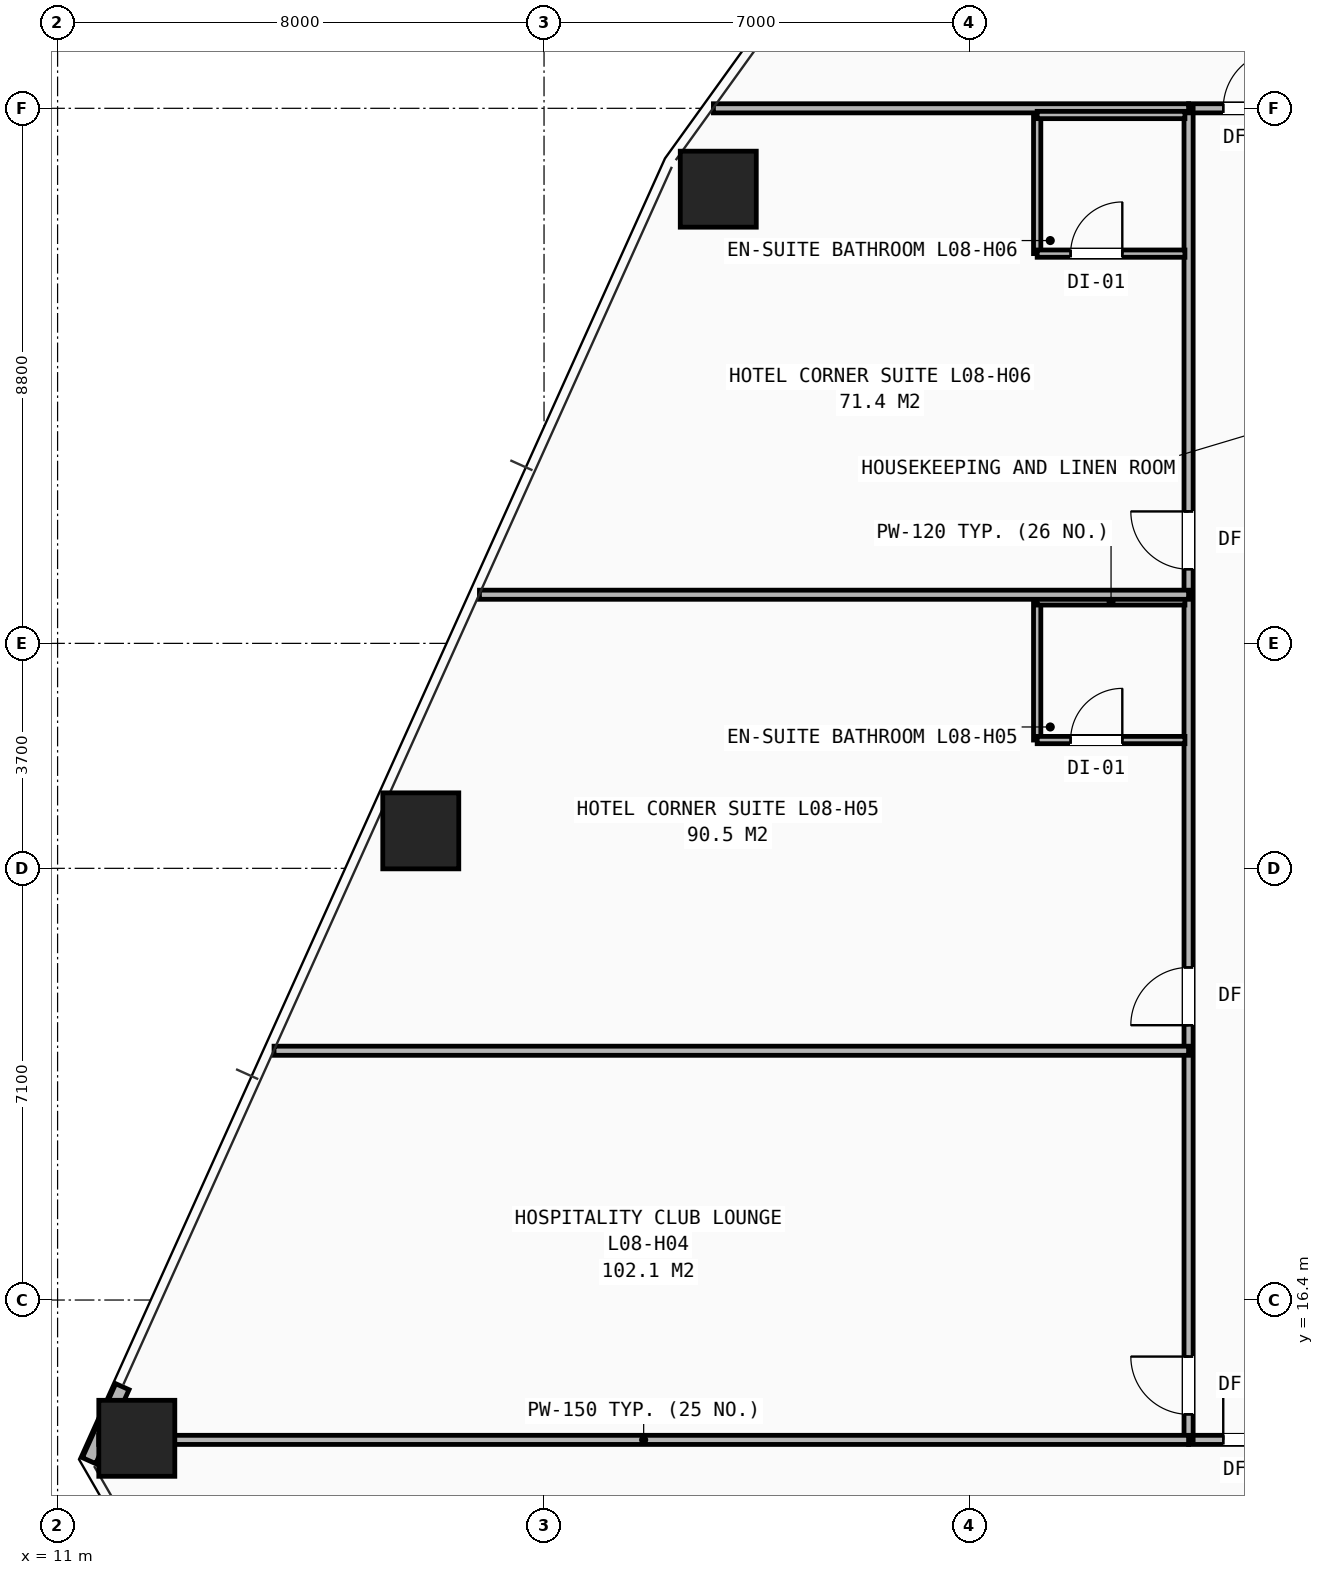
"""IFC4 building model, lengths in metres.
Left out: names, types, materials, properties, quantities, classifications, styles, units other than length and angle.
Written with IfcOpenShell. Run it as: python <this file> out.ifc"""

import sys

from ifc_helpers import new_model, si_unit, direction, frame, frame_2d, origin, origin_2d, place, context, subcontext, project, spatial, rectangle, hollow_rectangle, extrude, element, fill, save


model = new_model("IFC4")
c1 = context("Model", 3, precision=1e-05, world=origin(), true_north=direction((0.0, 1.0)))
c2 = subcontext(c1, "Body", "Model", "MODEL_VIEW")
j1 = project(units=[si_unit("LENGTHUNIT", "METRE"), si_unit("PLANEANGLEUNIT", "RADIAN")], contexts=[c1])
p1 = place(None, origin())
s1 = spatial("IfcSite", under=j1, at=p1, CompositionType="ELEMENT")
p2 = place(p1, origin())
s2 = spatial("IfcBuilding", under=s1, at=p2, CompositionType="ELEMENT")
p3 = place(p2, frame((0.0, 0.0, 33.6)))
s3 = spatial("IfcBuildingStorey", under=s2, at=p3, CompositionType="ELEMENT", Elevation=33.6)
for number, where, z_axis, x_axis in (
    (1, (21.865, 34.67, 0.0), (0.0, 0.0, 1.0), (1.0, 0.0, 0.0)),
    (2, (16.973, 24.116, 0.0), (0.0, 0.0, 1.0), (1.0, 0.0, 0.0)),
    (3, (12.303, 14.126, 0.0), (0.0, 0.0, 1.0), (1.0, 0.0, 0.0)),
):
    element("IfcColumn", number, at=place(p3, frame(where, z_axis=z_axis, x_axis=x_axis)), inside=s3, PredefinedType="COLUMN", context=c2, shape_type="SweptSolid", body=[
        extrude(hollow_rectangle(XDim=1.25, YDim=1.25, WallThickness=0.08, at=origin_2d()), origin(), (0.0, 0.0, 1.0), 3.2),
    ])
p4 = place(p3, frame((12.065, 14.975, 0.0), z_axis=(0.0, 0.0, 1.0), x_axis=(-0.410767856127, -0.91173996752, 0.0)))
e4 = element("IfcWall", 4, at=p4, inside=s3, PredefinedType="SHEAR", context=c2, shape_type="SweptSolid", body=[
    extrude(rectangle(XDim=1.334, YDim=0.24, at=frame_2d((0.667, 0.0))), origin(), (0.0, 0.0, 1.0), 2.263),
])
p5 = place(p3, frame((29.6, 14.1, 0.0), z_axis=(0.0, 0.0, 1.0), x_axis=(1.0, 0.0, 0.0)))
e5 = element("IfcWall", 5, at=p5, inside=s3, PredefinedType="PARTITIONING", context=c2, shape_type="SweptSolid", body=[
    extrude(rectangle(XDim=20.8, YDim=0.15, at=frame_2d((10.4, 0.0))), origin(), (0.0, 0.0, 1.0), 2.191),
])
p6 = place(p5, frame((0.57, 0.0, 0.0)))
e6 = element("IfcOpeningElement", 6, at=p6, cuts=e5, PredefinedType="OPENING", context=c2, shape_type="SweptSolid", body=[
    extrude(rectangle(XDim=0.95, YDim=2.1, at=frame_2d((0.475, 1.05))), frame((0.0, 0.085, 0.0), z_axis=(0.0, -1.0, 0.0), x_axis=(1.0, 0.0, 0.0)), (0.0, 0.0, 1.0), 0.17),
])
p7 = place(p5, frame((5.32, 0.0, 0.0)))
e7 = element("IfcOpeningElement", 7, at=p7, cuts=e5, PredefinedType="OPENING", context=c2, shape_type="SweptSolid", body=[
    extrude(rectangle(XDim=0.95, YDim=2.1, at=frame_2d((0.475, 1.05))), frame((0.0, 0.085, 0.0), z_axis=(0.0, -1.0, 0.0), x_axis=(1.0, 0.0, 0.0)), (0.0, 0.0, 1.0), 0.17),
])
p8 = place(p5, frame((13.32, 0.0, 0.0)))
e8 = element("IfcOpeningElement", 8, at=p8, cuts=e5, PredefinedType="OPENING", context=c2, shape_type="SweptSolid", body=[
    extrude(rectangle(XDim=0.95, YDim=2.1, at=frame_2d((0.475, 1.05))), frame((0.0, 0.085, 0.0), z_axis=(0.0, -1.0, 0.0), x_axis=(1.0, 0.0, 0.0)), (0.0, 0.0, 1.0), 0.17),
])
p9 = place(p3, frame((29.6, 36.0, 0.0), z_axis=(0.0, 0.0, 1.0), x_axis=(1.0, 0.0, 0.0)))
e9 = element("IfcWall", 9, at=p9, inside=s3, PredefinedType="PARTITIONING", context=c2, shape_type="SweptSolid", body=[
    extrude(rectangle(XDim=10.375, YDim=0.15, at=frame_2d((5.188, 0.0))), origin(), (0.0, 0.0, 1.0), 2.98),
])
p10 = place(p9, frame((0.57, 0.0, 0.0)))
e10 = element("IfcOpeningElement", 10, at=p10, cuts=e9, PredefinedType="OPENING", context=c2, shape_type="SweptSolid", body=[
    extrude(rectangle(XDim=0.95, YDim=2.1, at=frame_2d((0.475, 1.05))), frame((0.0, 0.085, 0.0), z_axis=(0.0, -1.0, 0.0), x_axis=(1.0, 0.0, 0.0)), (0.0, 0.0, 1.0), 0.17),
])
p11 = place(p9, frame((5.32, 0.0, 0.0)))
e11 = element("IfcOpeningElement", 11, at=p11, cuts=e9, PredefinedType="OPENING", context=c2, shape_type="SweptSolid", body=[
    extrude(rectangle(XDim=0.95, YDim=2.1, at=frame_2d((0.475, 1.05))), frame((0.0, 0.085, 0.0), z_axis=(0.0, -1.0, 0.0), x_axis=(1.0, 0.0, 0.0)), (0.0, 0.0, 1.0), 0.17),
])
p12 = place(p3, frame((29.6, 14.1, 0.0), z_axis=(0.0, 0.0, 1.0), x_axis=(0.0, 1.0, 0.0)))
e12 = element("IfcWall", 12, at=p12, inside=s3, PredefinedType="PARTITIONING", context=c2, shape_type="SweptSolid", body=[
    extrude(rectangle(XDim=21.9, YDim=0.15, at=frame_2d((10.95, 0.0))), origin(), (0.0, 0.0, 1.0), 2.191),
])
p13 = place(p12, frame((0.42, 0.0, 0.0)))
e13 = element("IfcOpeningElement", 13, at=p13, cuts=e12, PredefinedType="OPENING", context=c2, shape_type="SweptSolid", body=[
    extrude(rectangle(XDim=0.95, YDim=2.1, at=frame_2d((0.475, 1.05))), frame((0.0, 0.085, 0.0), z_axis=(0.0, -1.0, 0.0), x_axis=(1.0, 0.0, 0.0)), (0.0, 0.0, 1.0), 0.17),
])
p14 = place(p12, frame((6.82, 0.0, 0.0)))
e14 = element("IfcOpeningElement", 14, at=p14, cuts=e12, PredefinedType="OPENING", context=c2, shape_type="SweptSolid", body=[
    extrude(rectangle(XDim=0.95, YDim=2.1, at=frame_2d((0.475, 1.05))), frame((0.0, 0.085, 0.0), z_axis=(0.0, -1.0, 0.0), x_axis=(1.0, 0.0, 0.0)), (0.0, 0.0, 1.0), 0.17),
])
p15 = place(p12, frame((14.32, 0.0, 0.0)))
e15 = element("IfcOpeningElement", 15, at=p15, cuts=e12, PredefinedType="OPENING", context=c2, shape_type="SweptSolid", body=[
    extrude(rectangle(XDim=0.95, YDim=2.1, at=frame_2d((0.475, 1.05))), frame((0.0, 0.085, 0.0), z_axis=(0.0, -1.0, 0.0), x_axis=(1.0, 0.0, 0.0)), (0.0, 0.0, 1.0), 0.17),
])
p16 = place(p3, frame((11.677, 14.1, 0.0), z_axis=(0.0, 0.0, 1.0), x_axis=(1.0, 0.0, 0.0)))
e16 = element("IfcWall", 16, at=p16, inside=s3, PredefinedType="PARTITIONING", context=c2, shape_type="SweptSolid", body=[
    extrude(rectangle(XDim=17.923, YDim=0.15, at=frame_2d((8.961, 0.0))), origin(), (0.0, 0.0, 1.0), 2.191),
])
p17 = place(p3, frame((21.786, 36.0, 0.0), z_axis=(0.0, 0.0, 1.0), x_axis=(1.0, 0.0, 0.0)))
e17 = element("IfcWall", 17, at=p17, inside=s3, PredefinedType="PARTITIONING", context=c2, shape_type="SweptSolid", body=[
    extrude(rectangle(XDim=7.814, YDim=0.15, at=frame_2d((3.907, 0.0))), origin(), (0.0, 0.0, 1.0), 2.268),
])
p18 = place(p3, frame((14.56, 20.5, 0.0), z_axis=(0.0, 0.0, 1.0), x_axis=(1.0, 0.0, 0.0)))
e18 = element("IfcWall", 18, at=p18, inside=s3, PredefinedType="PARTITIONING", context=c2, shape_type="SweptSolid", body=[
    extrude(rectangle(XDim=15.041, YDim=0.15, at=frame_2d((7.52, 0.0))), origin(), (0.0, 0.0, 1.0), 2.268),
])
p19 = place(p3, frame((27.11, 25.61, 0.0), z_axis=(0.0, 0.0, 1.0), x_axis=(0.0, 1.0, 0.0)))
e19 = element("IfcWall", 19, at=p19, inside=s3, PredefinedType="PARTITIONING", context=c2, shape_type="SweptSolid", body=[
    extrude(rectangle(XDim=2.28, YDim=0.12, at=frame_2d((1.14, 0.0))), origin(), (0.0, 0.0, 1.0), 2.98),
])
p20 = place(p3, frame((27.11, 25.61, 0.0), z_axis=(0.0, 0.0, 1.0), x_axis=(1.0, 0.0, 0.0)))
e20 = element("IfcWall", 20, at=p20, inside=s3, PredefinedType="PARTITIONING", context=c2, shape_type="SweptSolid", body=[
    extrude(rectangle(XDim=2.43, YDim=0.12, at=frame_2d((1.215, 0.0))), origin(), (0.0, 0.0, 1.0), 2.98),
])
p21 = place(p20, frame((0.55, 0.0, 0.0)))
e21 = element("IfcOpeningElement", 21, at=p21, cuts=e20, PredefinedType="OPENING", context=c2, shape_type="SweptSolid", body=[
    extrude(rectangle(XDim=0.85, YDim=2.05, at=frame_2d((0.425, 1.025))), frame((0.0, 0.07, 0.0), z_axis=(0.0, -1.0, 0.0), x_axis=(1.0, 0.0, 0.0)), (0.0, 0.0, 1.0), 0.14),
])
p22 = place(p3, frame((27.11, 27.89, 0.0), z_axis=(0.0, 0.0, 1.0), x_axis=(1.0, 0.0, 0.0)))
e22 = element("IfcWall", 22, at=p22, inside=s3, PredefinedType="PARTITIONING", context=c2, shape_type="SweptSolid", body=[
    extrude(rectangle(XDim=2.43, YDim=0.12, at=frame_2d((1.215, 0.0))), origin(), (0.0, 0.0, 1.0), 2.98),
])
p23 = place(p3, frame((17.938, 28.0, 0.0), z_axis=(0.0, 0.0, 1.0), x_axis=(1.0, 0.0, 0.0)))
e23 = element("IfcWall", 23, at=p23, inside=s3, PredefinedType="PARTITIONING", context=c2, shape_type="SweptSolid", body=[
    extrude(rectangle(XDim=11.662, YDim=0.15, at=frame_2d((5.831, 0.0))), origin(), (0.0, 0.0, 1.0), 2.268),
])
p24 = place(p3, frame((27.11, 33.61, 0.0), z_axis=(0.0, 0.0, 1.0), x_axis=(0.0, 1.0, 0.0)))
e24 = element("IfcWall", 24, at=p24, inside=s3, PredefinedType="PARTITIONING", context=c2, shape_type="SweptSolid", body=[
    extrude(rectangle(XDim=2.28, YDim=0.12, at=frame_2d((1.14, 0.0))), origin(), (0.0, 0.0, 1.0), 2.513),
])
p25 = place(p3, frame((27.11, 33.61, 0.0), z_axis=(0.0, 0.0, 1.0), x_axis=(1.0, 0.0, 0.0)))
e25 = element("IfcWall", 25, at=p25, inside=s3, PredefinedType="PARTITIONING", context=c2, shape_type="SweptSolid", body=[
    extrude(rectangle(XDim=2.43, YDim=0.12, at=frame_2d((1.215, 0.0))), origin(), (0.0, 0.0, 1.0), 2.98),
])
p26 = place(p25, frame((0.55, 0.0, 0.0)))
e26 = element("IfcOpeningElement", 26, at=p26, cuts=e25, PredefinedType="OPENING", context=c2, shape_type="SweptSolid", body=[
    extrude(rectangle(XDim=0.85, YDim=2.05, at=frame_2d((0.425, 1.025))), frame((0.0, 0.07, 0.0), z_axis=(0.0, -1.0, 0.0), x_axis=(1.0, 0.0, 0.0)), (0.0, 0.0, 1.0), 0.14),
])
p27 = place(p3, frame((27.11, 35.89, 0.0), z_axis=(0.0, 0.0, 1.0), x_axis=(1.0, 0.0, 0.0)))
e27 = element("IfcWall", 27, at=p27, inside=s3, PredefinedType="PARTITIONING", context=c2, shape_type="SweptSolid", body=[
    extrude(rectangle(XDim=2.43, YDim=0.12, at=frame_2d((1.215, 0.0))), origin(), (0.0, 0.0, 1.0), 2.513),
])
p28 = place(p6, origin())
e28 = element("IfcDoor", 28, at=p28, inside=s3, OperationType="SINGLE_SWING_LEFT", PredefinedType="DOOR", context=c2, shape_type="SweptSolid", body=[
    extrude(rectangle(XDim=0.95, YDim=2.1, at=frame_2d((0.475, 1.05))), frame((0.0, 0.025, 0.0), z_axis=(0.0, -1.0, 0.0), x_axis=(1.0, 0.0, 0.0)), (0.0, 0.0, 1.0), 0.05),
])
fill(e6, e28)
p29 = place(p13, origin())
e29 = element("IfcDoor", 29, at=p29, inside=s3, OperationType="SINGLE_SWING_RIGHT", PredefinedType="DOOR", context=c2, shape_type="SweptSolid", body=[
    extrude(rectangle(XDim=0.95, YDim=2.1, at=frame_2d((0.475, 1.05))), frame((0.0, 0.025, 0.0), z_axis=(0.0, -1.0, 0.0), x_axis=(1.0, 0.0, 0.0)), (0.0, 0.0, 1.0), 0.05),
])
fill(e13, e29)
p30 = place(p14, origin())
e30 = element("IfcDoor", 30, at=p30, inside=s3, OperationType="SINGLE_SWING_LEFT", PredefinedType="DOOR", context=c2, shape_type="SweptSolid", body=[
    extrude(rectangle(XDim=0.95, YDim=2.1, at=frame_2d((0.475, 1.05))), frame((0.0, 0.025, 0.0), z_axis=(0.0, -1.0, 0.0), x_axis=(1.0, 0.0, 0.0)), (0.0, 0.0, 1.0), 0.05),
])
fill(e14, e30)
p31 = place(p21, origin())
e31 = element("IfcDoor", 31, at=p31, inside=s3, OperationType="SINGLE_SWING_RIGHT", PredefinedType="DOOR", context=c2, shape_type="SweptSolid", body=[
    extrude(rectangle(XDim=0.85, YDim=2.05, at=frame_2d((0.425, 1.025))), frame((0.0, 0.025, 0.0), z_axis=(0.0, -1.0, 0.0), x_axis=(1.0, 0.0, 0.0)), (0.0, 0.0, 1.0), 0.05),
])
fill(e21, e31)
p32 = place(p15, origin())
e32 = element("IfcDoor", 32, at=p32, inside=s3, OperationType="SINGLE_SWING_RIGHT", PredefinedType="DOOR", context=c2, shape_type="SweptSolid", body=[
    extrude(rectangle(XDim=0.95, YDim=2.1, at=frame_2d((0.475, 1.05))), frame((0.0, 0.025, 0.0), z_axis=(0.0, -1.0, 0.0), x_axis=(1.0, 0.0, 0.0)), (0.0, 0.0, 1.0), 0.05),
])
fill(e15, e32)
p33 = place(p26, origin())
e33 = element("IfcDoor", 33, at=p33, inside=s3, OperationType="SINGLE_SWING_RIGHT", PredefinedType="DOOR", context=c2, shape_type="SweptSolid", body=[
    extrude(rectangle(XDim=0.85, YDim=2.05, at=frame_2d((0.425, 1.025))), frame((0.0, 0.025, 0.0), z_axis=(0.0, -1.0, 0.0), x_axis=(1.0, 0.0, 0.0)), (0.0, 0.0, 1.0), 0.05),
])
fill(e26, e33)
p34 = place(p10, origin())
e34 = element("IfcDoor", 34, at=p34, inside=s3, OperationType="SINGLE_SWING_RIGHT", PredefinedType="DOOR", context=c2, shape_type="SweptSolid", body=[
    extrude(rectangle(XDim=0.95, YDim=2.1, at=frame_2d((0.475, 1.05))), frame((0.0, 0.025, 0.0), z_axis=(0.0, -1.0, 0.0), x_axis=(1.0, 0.0, 0.0)), (0.0, 0.0, 1.0), 0.05),
])
fill(e10, e34)
save(model, sys.argv[1])
